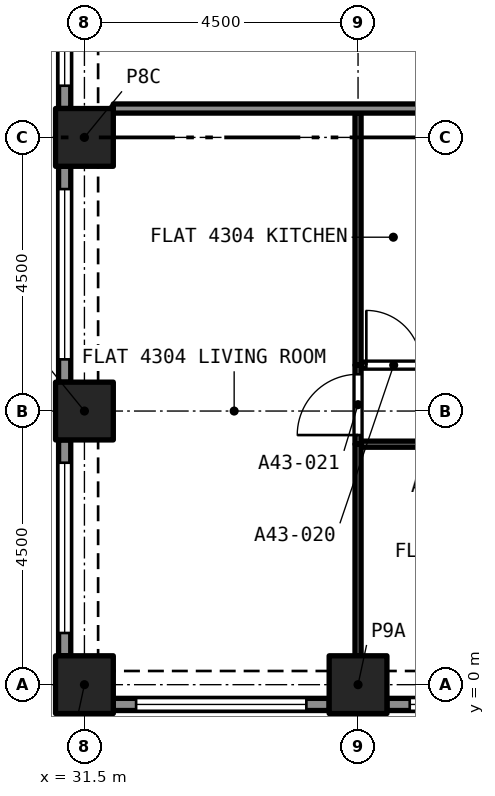
"""IFC4 building model, lengths in metres.
Left out: names, types, materials, properties, quantities, classifications, styles, units other than length and angle.
Written with IfcOpenShell. Run it as: python <this file> out.ifc"""

import sys

from ifc_helpers import new_model, si_unit, direction, frame, frame_2d, origin, origin_2d, place, context, subcontext, project, spatial, rectangle, extrude, element, fill, save


model = new_model("IFC4")
c1 = context("Model", 3, precision=1e-05, world=origin(), true_north=direction((0.0, 1.0)))
c2 = subcontext(c1, "Body", "Model", "MODEL_VIEW")
j1 = project(units=[si_unit("LENGTHUNIT", "METRE"), si_unit("PLANEANGLEUNIT", "RADIAN")], contexts=[c1])
p1 = place(None, origin())
s1 = spatial("IfcSite", under=j1, at=p1, CompositionType="ELEMENT")
p2 = place(p1, origin())
s2 = spatial("IfcBuilding", under=s1, at=p2, CompositionType="ELEMENT")
p3 = place(p2, frame((0.0, 0.0, 155.0)))
s3 = spatial("IfcBuildingStorey", under=s2, at=p3, CompositionType="ELEMENT", Elevation=155.0)
for number, where, z_axis, x_axis in (
    (1, (31.5, 0.0, 0.0), (0.0, 0.0, 1.0), (1.0, 0.0, 0.0)),
    (2, (36.0, 0.0, 0.0), (0.0, 0.0, 1.0), (1.0, 0.0, 0.0)),
    (3, (31.5, 4.5, 0.0), (0.0, 0.0, 1.0), (1.0, 0.0, 0.0)),
    (4, (31.5, 9.0, 0.0), (0.0, 0.0, 1.0), (1.0, 0.0, 0.0)),
):
    element("IfcColumn", number, at=place(p3, frame(where, z_axis=z_axis, x_axis=x_axis)), inside=s3, PredefinedType="COLUMN", context=c2, shape_type="SweptSolid", body=[
        extrude(rectangle(XDim=0.95, YDim=0.95, at=origin_2d()), origin(), (0.0, 0.0, 1.0), 4.4),
    ])
p4 = place(p3, frame((35.525, -0.325, 0.0), z_axis=(0.0, 0.0, 1.0), x_axis=(-1.0, 0.0, 0.0)))
e5 = element("IfcWall", 5, at=p4, inside=s3, PredefinedType="SOLIDWALL", context=c2, shape_type="SweptSolid", body=[
    extrude(rectangle(XDim=3.55, YDim=0.2, at=frame_2d((1.775, 0.0))), origin(), (0.0, 0.0, 1.0), 4.4),
])
p5 = place(p4, frame((0.375, 0.0, 0.45)))
e6 = element("IfcOpeningElement", 6, at=p5, cuts=e5, PredefinedType="OPENING", context=c2, shape_type="SweptSolid", body=[
    extrude(rectangle(XDim=2.8, YDim=2.55, at=frame_2d((1.4, 1.275))), frame((0.0, 0.11, 0.0), z_axis=(0.0, -1.0, 0.0), x_axis=(1.0, 0.0, 0.0)), (0.0, 0.0, 1.0), 0.22),
])
p6 = place(p3, frame((40.025, -0.325, 0.0), z_axis=(0.0, 0.0, 1.0), x_axis=(-1.0, 0.0, 0.0)))
e7 = element("IfcWall", 7, at=p6, inside=s3, PredefinedType="SOLIDWALL", context=c2, shape_type="SweptSolid", body=[
    extrude(rectangle(XDim=3.55, YDim=0.2, at=frame_2d((1.775, 0.0))), origin(), (0.0, 0.0, 1.0), 4.4),
])
p7 = place(p6, frame((0.375, 0.0, 0.45)))
e8 = element("IfcOpeningElement", 8, at=p7, cuts=e7, PredefinedType="OPENING", context=c2, shape_type="SweptSolid", body=[
    extrude(rectangle(XDim=2.8, YDim=2.55, at=frame_2d((1.4, 1.275))), frame((0.0, 0.11, 0.0), z_axis=(0.0, -1.0, 0.0), x_axis=(1.0, 0.0, 0.0)), (0.0, 0.0, 1.0), 0.22),
])
p8 = place(p3, frame((31.175, 9.475, 0.0), z_axis=(0.0, 0.0, 1.0), x_axis=(0.0, 1.0, 0.0)))
e9 = element("IfcWall", 9, at=p8, inside=s3, PredefinedType="SOLIDWALL", context=c2, shape_type="SweptSolid", body=[
    extrude(rectangle(XDim=3.55, YDim=0.2, at=frame_2d((1.775, 0.0))), origin(), (0.0, 0.0, 1.0), 4.4),
])
p9 = place(p8, frame((0.375, 0.0, 0.45)))
e10 = element("IfcOpeningElement", 10, at=p9, cuts=e9, PredefinedType="OPENING", context=c2, shape_type="SweptSolid", body=[
    extrude(rectangle(XDim=2.8, YDim=2.55, at=frame_2d((1.4, 1.275))), frame((0.0, 0.11, 0.0), z_axis=(0.0, -1.0, 0.0), x_axis=(1.0, 0.0, 0.0)), (0.0, 0.0, 1.0), 0.22),
])
p10 = place(p3, frame((31.175, 4.975, 0.0), z_axis=(0.0, 0.0, 1.0), x_axis=(0.0, 1.0, 0.0)))
e11 = element("IfcWall", 11, at=p10, inside=s3, PredefinedType="SOLIDWALL", context=c2, shape_type="SweptSolid", body=[
    extrude(rectangle(XDim=3.55, YDim=0.2, at=frame_2d((1.775, 0.0))), origin(), (0.0, 0.0, 1.0), 4.4),
])
p11 = place(p10, frame((0.375, 0.0, 0.45)))
e12 = element("IfcOpeningElement", 12, at=p11, cuts=e11, PredefinedType="OPENING", context=c2, shape_type="SweptSolid", body=[
    extrude(rectangle(XDim=2.8, YDim=2.55, at=frame_2d((1.4, 1.275))), frame((0.0, 0.11, 0.0), z_axis=(0.0, -1.0, 0.0), x_axis=(1.0, 0.0, 0.0)), (0.0, 0.0, 1.0), 0.22),
])
p12 = place(p3, frame((31.175, 0.475, 0.0), z_axis=(0.0, 0.0, 1.0), x_axis=(0.0, 1.0, 0.0)))
e13 = element("IfcWall", 13, at=p12, inside=s3, PredefinedType="SOLIDWALL", context=c2, shape_type="SweptSolid", body=[
    extrude(rectangle(XDim=3.55, YDim=0.2, at=frame_2d((1.775, 0.0))), origin(), (0.0, 0.0, 1.0), 4.4),
])
p13 = place(p12, frame((0.375, 0.0, 0.45)))
e14 = element("IfcOpeningElement", 14, at=p13, cuts=e13, PredefinedType="OPENING", context=c2, shape_type="SweptSolid", body=[
    extrude(rectangle(XDim=2.8, YDim=2.55, at=frame_2d((1.4, 1.275))), frame((0.0, 0.11, 0.0), z_axis=(0.0, -1.0, 0.0), x_axis=(1.0, 0.0, 0.0)), (0.0, 0.0, 1.0), 0.22),
])
p14 = place(p3, frame((40.4, 3.955, 0.0), z_axis=(0.0, 0.0, 1.0), x_axis=(-1.0, 0.0, 0.0)))
e15 = element("IfcWall", 15, at=p14, inside=s3, PredefinedType="PARTITIONING", context=c2, shape_type="SweptSolid", body=[
    extrude(rectangle(XDim=4.35, YDim=0.1, at=frame_2d((2.175, 0.0))), origin(), (0.0, 0.0, 1.0), 4.1),
])
p15 = place(p14, frame((1.7, 0.0, 0.0)))
e16 = element("IfcOpeningElement", 16, at=p15, cuts=e15, PredefinedType="OPENING", context=c2, shape_type="SweptSolid", body=[
    extrude(rectangle(XDim=0.9, YDim=2.1, at=frame_2d((0.45, 1.05))), frame((0.0, 0.06, 0.0), z_axis=(0.0, -1.0, 0.0), x_axis=(1.0, 0.0, 0.0)), (0.0, 0.0, 1.0), 0.12),
])
p16 = place(p3, frame((36.0, 0.475, 0.0), z_axis=(0.0, 0.0, 1.0), x_axis=(0.0, 1.0, 0.0)))
e17 = element("IfcWall", 17, at=p16, inside=s3, PredefinedType="PARTITIONING", context=c2, shape_type="SweptSolid", body=[
    extrude(rectangle(XDim=3.48, YDim=0.1, at=frame_2d((1.74, 0.0))), origin(), (0.0, 0.0, 1.0), 4.1),
])
p17 = place(p3, frame((36.05, 5.255, 0.0), z_axis=(0.0, 0.0, 1.0), x_axis=(1.0, 0.0, 0.0)))
e18 = element("IfcWall", 18, at=p17, inside=s3, PredefinedType="PARTITIONING", context=c2, shape_type="SweptSolid", body=[
    extrude(rectangle(XDim=1.123, YDim=0.1, at=frame_2d((0.561, 0.0))), origin(), (0.0, 0.0, 1.0), 4.1),
])
p18 = place(p17, frame((0.086, 0.0, 0.0)))
e19 = element("IfcOpeningElement", 19, at=p18, cuts=e18, PredefinedType="OPENING", context=c2, shape_type="SweptSolid", body=[
    extrude(rectangle(XDim=0.9, YDim=2.1, at=frame_2d((0.45, 1.05))), frame((0.0, 0.06, 0.0), z_axis=(0.0, -1.0, 0.0), x_axis=(1.0, 0.0, 0.0)), (0.0, 0.0, 1.0), 0.12),
])
p19 = place(p3, frame((36.0, 3.955, 0.0), z_axis=(0.0, 0.0, 1.0), x_axis=(0.0, 1.0, 0.0)))
e20 = element("IfcWall", 20, at=p19, inside=s3, PredefinedType="PARTITIONING", context=c2, shape_type="SweptSolid", body=[
    extrude(rectangle(XDim=1.3, YDim=0.1, at=frame_2d((0.65, 0.0))), origin(), (0.0, 0.0, 1.0), 4.1),
])
p20 = place(p19, frame((0.15, 0.0, 0.0)))
e21 = element("IfcOpeningElement", 21, at=p20, cuts=e20, PredefinedType="OPENING", context=c2, shape_type="SweptSolid", body=[
    extrude(rectangle(XDim=1.0, YDim=2.1, at=frame_2d((0.5, 1.05))), frame((0.0, 0.06, 0.0), z_axis=(0.0, -1.0, 0.0), x_axis=(1.0, 0.0, 0.0)), (0.0, 0.0, 1.0), 0.12),
])
p21 = place(p3, frame((36.0, 5.255, 0.0), z_axis=(0.0, 0.0, 1.0), x_axis=(0.0, 1.0, 0.0)))
e22 = element("IfcWall", 22, at=p21, inside=s3, PredefinedType="PARTITIONING", context=c2, shape_type="SweptSolid", body=[
    extrude(rectangle(XDim=4.145, YDim=0.1, at=frame_2d((2.073, 0.0))), origin(), (0.0, 0.0, 1.0), 4.1),
])
p22 = place(p3, frame((31.975, 9.475, 0.0), z_axis=(0.0, 0.0, 1.0), x_axis=(1.0, 0.0, 0.0)))
e23 = element("IfcWall", 23, at=p22, inside=s3, PredefinedType="PARTITIONING", context=c2, shape_type="SweptSolid", body=[
    extrude(rectangle(XDim=6.175, YDim=0.15, at=frame_2d((3.087, 0.0))), origin(), (0.0, 0.0, 1.0), 4.1),
])
p23 = place(p5, origin())
e24 = element("IfcWindow", 24, at=p23, inside=s3, PartitioningType="SINGLE_PANEL", PredefinedType="WINDOW", context=c2, shape_type="SweptSolid", body=[
    extrude(rectangle(XDim=2.8, YDim=2.55, at=frame_2d((1.4, 1.275))), frame((0.0, 0.03, 0.0), z_axis=(0.0, -1.0, 0.0), x_axis=(1.0, 0.0, 0.0)), (0.0, 0.0, 1.0), 0.06),
])
fill(e6, e24)
p24 = place(p7, origin())
e25 = element("IfcWindow", 25, at=p24, inside=s3, PartitioningType="SINGLE_PANEL", PredefinedType="WINDOW", context=c2, shape_type="SweptSolid", body=[
    extrude(rectangle(XDim=2.8, YDim=2.55, at=frame_2d((1.4, 1.275))), frame((0.0, 0.03, 0.0), z_axis=(0.0, -1.0, 0.0), x_axis=(1.0, 0.0, 0.0)), (0.0, 0.0, 1.0), 0.06),
])
fill(e8, e25)
p25 = place(p9, origin())
e26 = element("IfcWindow", 26, at=p25, inside=s3, PartitioningType="SINGLE_PANEL", PredefinedType="WINDOW", context=c2, shape_type="SweptSolid", body=[
    extrude(rectangle(XDim=2.8, YDim=2.55, at=frame_2d((1.4, 1.275))), frame((0.0, 0.03, 0.0), z_axis=(0.0, -1.0, 0.0), x_axis=(1.0, 0.0, 0.0)), (0.0, 0.0, 1.0), 0.06),
])
fill(e10, e26)
p26 = place(p11, origin())
e27 = element("IfcWindow", 27, at=p26, inside=s3, PartitioningType="SINGLE_PANEL", PredefinedType="WINDOW", context=c2, shape_type="SweptSolid", body=[
    extrude(rectangle(XDim=2.8, YDim=2.55, at=frame_2d((1.4, 1.275))), frame((0.0, 0.03, 0.0), z_axis=(0.0, -1.0, 0.0), x_axis=(1.0, 0.0, 0.0)), (0.0, 0.0, 1.0), 0.06),
])
fill(e12, e27)
p27 = place(p13, origin())
e28 = element("IfcWindow", 28, at=p27, inside=s3, PartitioningType="SINGLE_PANEL", PredefinedType="WINDOW", context=c2, shape_type="SweptSolid", body=[
    extrude(rectangle(XDim=2.8, YDim=2.55, at=frame_2d((1.4, 1.275))), frame((0.0, 0.03, 0.0), z_axis=(0.0, -1.0, 0.0), x_axis=(1.0, 0.0, 0.0)), (0.0, 0.0, 1.0), 0.06),
])
fill(e14, e28)
p28 = place(p18, origin())
e29 = element("IfcDoor", 29, at=p28, inside=s3, OperationType="SINGLE_SWING_LEFT", PredefinedType="DOOR", context=c2, shape_type="SweptSolid", body=[
    extrude(rectangle(XDim=0.9, YDim=2.1, at=frame_2d((0.45, 1.05))), frame((0.0, 0.025, 0.0), z_axis=(0.0, -1.0, 0.0), x_axis=(1.0, 0.0, 0.0)), (0.0, 0.0, 1.0), 0.05),
])
fill(e19, e29)
p29 = place(p20, origin())
e30 = element("IfcDoor", 30, at=p29, inside=s3, OperationType="SINGLE_SWING_LEFT", PredefinedType="DOOR", context=c2, shape_type="SweptSolid", body=[
    extrude(rectangle(XDim=1.0, YDim=2.1, at=frame_2d((0.5, 1.05))), frame((0.0, 0.025, 0.0), z_axis=(0.0, -1.0, 0.0), x_axis=(1.0, 0.0, 0.0)), (0.0, 0.0, 1.0), 0.05),
])
fill(e21, e30)
save(model, sys.argv[1])
